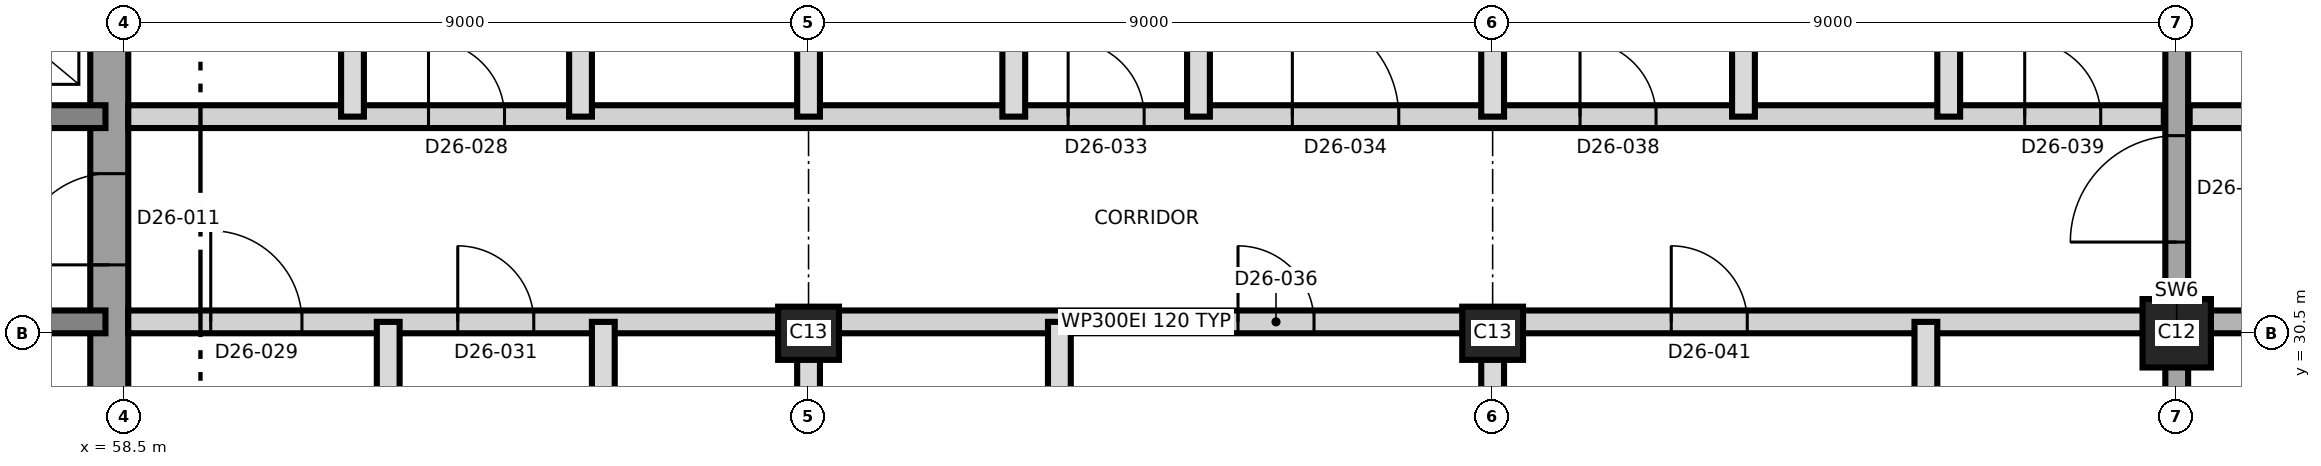
"""IFC4 building model, lengths in metres.
Left out: names, types, materials, properties, quantities, classifications, styles, units other than length and angle.
Written with IfcOpenShell. Run it as: python <this file> out.ifc"""

import sys

from ifc_helpers import new_model, si_unit, direction, frame, frame_2d, origin, origin_2d, place, context, subcontext, project, spatial, rectangle, extrude, element, fill, save


model = new_model("IFC4")
c1 = context("Model", 3, precision=1e-05, world=origin(), true_north=direction((0.0, 1.0)))
c2 = subcontext(c1, "Body", "Model", "MODEL_VIEW")
j1 = project(units=[si_unit("LENGTHUNIT", "METRE"), si_unit("PLANEANGLEUNIT", "RADIAN")], contexts=[c1])
p1 = place(None, origin())
s1 = spatial("IfcSite", under=j1, at=p1, CompositionType="ELEMENT")
p2 = place(p1, origin())
s2 = spatial("IfcBuilding", under=s1, at=p2, CompositionType="ELEMENT")
p3 = place(p2, frame((0.0, 0.0, 236.5)))
s3 = spatial("IfcBuildingStorey", under=s2, at=p3, CompositionType="ELEMENT", Elevation=236.5)
p4 = place(p3, frame((58.3, 21.25, 0.0), z_axis=(0.0, 0.0, 1.0), x_axis=(0.0, 1.0, 0.0)))
e1 = element("IfcWall", 1, at=p4, inside=s3, PredefinedType="SHEAR", context=c2, shape_type="SweptSolid", body=[
    extrude(rectangle(XDim=18.5, YDim=0.5, at=frame_2d((9.25, 0.0))), origin(), (0.0, 0.0, 1.0), 3.7),
])
p5 = place(p4, frame((10.15, 0.0, 0.0)))
e2 = element("IfcOpeningElement", 2, at=p5, cuts=e1, PredefinedType="OPENING", context=c2, shape_type="SweptSolid", body=[
    extrude(rectangle(XDim=1.2, YDim=2.1, at=frame_2d((0.6, 1.05))), frame((0.0, 0.26, 0.0), z_axis=(0.0, -1.0, 0.0), x_axis=(1.0, 0.0, 0.0)), (0.0, 0.0, 1.0), 0.52),
])
p6 = place(p3, frame((31.75, 30.65, 0.0), z_axis=(0.0, 0.0, 1.0), x_axis=(1.0, 0.0, 0.0)))
e3 = element("IfcWall", 3, at=p6, inside=s3, PredefinedType="SHEAR", context=c2, shape_type="SweptSolid", body=[
    extrude(rectangle(XDim=26.5, YDim=0.3, at=frame_2d((13.25, 0.0))), origin(), (0.0, 0.0, 1.0), 3.7),
])
p7 = place(p6, frame((24.75, 0.0, 0.0)))
e4 = element("IfcOpeningElement", 4, at=p7, cuts=e3, PredefinedType="OPENING", context=c2, shape_type="SweptSolid", body=[
    extrude(rectangle(XDim=1.0, YDim=2.1, at=frame_2d((0.5, 1.05))), frame((0.0, 0.16, 0.0), z_axis=(0.0, -1.0, 0.0), x_axis=(1.0, 0.0, 0.0)), (0.0, 0.0, 1.0), 0.32),
])
p8 = place(p3, frame((31.75, 33.35, 0.0), z_axis=(0.0, 0.0, 1.0), x_axis=(1.0, 0.0, 0.0)))
e5 = element("IfcWall", 5, at=p8, inside=s3, PredefinedType="SHEAR", context=c2, shape_type="SweptSolid", body=[
    extrude(rectangle(XDim=26.5, YDim=0.3, at=frame_2d((13.25, 0.0))), origin(), (0.0, 0.0, 1.0), 3.7),
])
p9 = place(p8, frame((13.9, 0.0, 0.0)))
e6 = element("IfcOpeningElement", 6, at=p9, cuts=e5, PredefinedType="OPENING", context=c2, shape_type="SweptSolid", body=[
    extrude(rectangle(XDim=1.4, YDim=2.1, at=frame_2d((0.7, 1.05))), frame((0.0, 0.16, 0.0), z_axis=(0.0, -1.0, 0.0), x_axis=(1.0, 0.0, 0.0)), (0.0, 0.0, 1.0), 0.32),
])
p10 = place(p8, frame((5.375, 0.0, 0.0)))
e7 = element("IfcOpeningElement", 7, at=p10, cuts=e5, PredefinedType="OPENING", context=c2, shape_type="SweptSolid", body=[
    extrude(rectangle(XDim=1.2, YDim=2.1, at=frame_2d((0.6, 1.05))), frame((0.0, 0.16, 0.0), z_axis=(0.0, -1.0, 0.0), x_axis=(1.0, 0.0, 0.0)), (0.0, 0.0, 1.0), 0.32),
])
p11 = place(p8, frame((19.925, 0.0, 0.0)))
e8 = element("IfcOpeningElement", 8, at=p11, cuts=e5, PredefinedType="OPENING", context=c2, shape_type="SweptSolid", body=[
    extrude(rectangle(XDim=1.2, YDim=2.1, at=frame_2d((0.6, 1.05))), frame((0.0, 0.16, 0.0), z_axis=(0.0, -1.0, 0.0), x_axis=(1.0, 0.0, 0.0)), (0.0, 0.0, 1.0), 0.32),
])
for number, where, z_axis, x_axis in (
    (9, (67.5, 30.5, 0.0), (0.0, 0.0, 1.0), (1.0, 0.0, 0.0)),
    (10, (76.5, 30.5, 0.0), (0.0, 0.0, 1.0), (1.0, 0.0, 0.0)),
):
    element("IfcColumn", number, at=place(p3, frame(where, z_axis=z_axis, x_axis=x_axis)), inside=s3, PredefinedType="COLUMN", context=c2, shape_type="SweptSolid", body=[
        extrude(rectangle(XDim=0.8, YDim=0.7, at=origin_2d()), origin(), (0.0, 0.0, 1.0), 3.7),
    ])
p12 = place(p3, frame((85.5, 30.5, 0.0), z_axis=(0.0, 0.0, 1.0), x_axis=(1.0, 0.0, 0.0)))
e11 = element("IfcColumn", 11, at=p12, inside=s3, PredefinedType="COLUMN", context=c2, shape_type="SweptSolid", body=[
    extrude(rectangle(XDim=0.9, YDim=0.9, at=origin_2d()), origin(), (0.0, 0.0, 1.0), 3.7),
])
p13 = place(p3, frame((85.5, 19.275, 0.0), z_axis=(0.0, 0.0, 1.0), x_axis=(0.0, 1.0, 0.0)))
e12 = element("IfcWall", 12, at=p13, inside=s3, PredefinedType="SHEAR", context=c2, shape_type="SweptSolid", body=[
    extrude(rectangle(XDim=22.45, YDim=0.3, at=frame_2d((11.225, 0.0))), origin(), (0.0, 0.0, 1.0), 3.7),
])
p14 = place(p13, frame((12.425, 0.0, 0.0)))
e13 = element("IfcOpeningElement", 13, at=p14, cuts=e12, PredefinedType="OPENING", context=c2, shape_type="SweptSolid", body=[
    extrude(rectangle(XDim=1.4, YDim=2.1, at=frame_2d((0.7, 1.05))), frame((0.0, 0.16, 0.0), z_axis=(0.0, -1.0, 0.0), x_axis=(1.0, 0.0, 0.0)), (0.0, 0.0, 1.0), 0.32),
])
p15 = place(p3, frame((58.55, 30.65, 0.0), z_axis=(0.0, 0.0, 1.0), x_axis=(1.0, 0.0, 0.0)))
e14 = element("IfcWall", 14, at=p15, inside=s3, PredefinedType="PARTITIONING", context=c2, shape_type="SweptSolid", body=[
    extrude(rectangle(XDim=26.78, YDim=0.3, at=frame_2d((13.39, 0.0))), origin(), (0.0, 0.0, 1.0), 3.4),
])
p16 = place(p15, frame((1.085, 0.0, 0.0)))
e15 = element("IfcOpeningElement", 15, at=p16, cuts=e14, PredefinedType="OPENING", context=c2, shape_type="SweptSolid", body=[
    extrude(rectangle(XDim=1.2, YDim=2.1, at=frame_2d((0.6, 1.05))), frame((0.0, 0.16, 0.0), z_axis=(0.0, -1.0, 0.0), x_axis=(1.0, 0.0, 0.0)), (0.0, 0.0, 1.0), 0.32),
])
p17 = place(p15, frame((4.335, 0.0, 0.0)))
e16 = element("IfcOpeningElement", 16, at=p17, cuts=e14, PredefinedType="OPENING", context=c2, shape_type="SweptSolid", body=[
    extrude(rectangle(XDim=1.0, YDim=2.1, at=frame_2d((0.5, 1.05))), frame((0.0, 0.16, 0.0), z_axis=(0.0, -1.0, 0.0), x_axis=(1.0, 0.0, 0.0)), (0.0, 0.0, 1.0), 0.32),
])
p18 = place(p15, frame((14.6, 0.0, 0.0)))
e17 = element("IfcOpeningElement", 17, at=p18, cuts=e14, PredefinedType="OPENING", context=c2, shape_type="SweptSolid", body=[
    extrude(rectangle(XDim=1.0, YDim=2.4, at=frame_2d((0.5, 1.2))), frame((0.0, 0.16, 0.0), z_axis=(0.0, -1.0, 0.0), x_axis=(1.0, 0.0, 0.0)), (0.0, 0.0, 1.0), 0.32),
])
p19 = place(p15, frame((20.3, 0.0, 0.0)))
e18 = element("IfcOpeningElement", 18, at=p19, cuts=e14, PredefinedType="OPENING", context=c2, shape_type="SweptSolid", body=[
    extrude(rectangle(XDim=1.0, YDim=2.4, at=frame_2d((0.5, 1.2))), frame((0.0, 0.16, 0.0), z_axis=(0.0, -1.0, 0.0), x_axis=(1.0, 0.0, 0.0)), (0.0, 0.0, 1.0), 0.32),
])
p20 = place(p3, frame((85.67, 30.65, 0.0), z_axis=(0.0, 0.0, 1.0), x_axis=(1.0, 0.0, 0.0)))
e19 = element("IfcWall", 19, at=p20, inside=s3, PredefinedType="SHEAR", context=c2, shape_type="SweptSolid", body=[
    extrude(rectangle(XDim=9.58, YDim=0.3, at=frame_2d((4.79, 0.0))), origin(), (0.0, 0.0, 1.0), 3.4),
])
p21 = place(p20, frame((2.08, 0.0, 0.0)))
e20 = element("IfcOpeningElement", 20, at=p21, cuts=e19, PredefinedType="OPENING", context=c2, shape_type="SweptSolid", body=[
    extrude(rectangle(XDim=1.2, YDim=2.1, at=frame_2d((0.6, 1.05))), frame((0.0, 0.16, 0.0), z_axis=(0.0, -1.0, 0.0), x_axis=(1.0, 0.0, 0.0)), (0.0, 0.0, 1.0), 0.32),
])
p22 = place(p20, frame((5.63, 0.0, 0.0)))
e21 = element("IfcOpeningElement", 21, at=p22, cuts=e19, PredefinedType="OPENING", context=c2, shape_type="SweptSolid", body=[
    extrude(rectangle(XDim=1.0, YDim=2.1, at=frame_2d((0.5, 1.05))), frame((0.0, 0.16, 0.0), z_axis=(0.0, -1.0, 0.0), x_axis=(1.0, 0.0, 0.0)), (0.0, 0.0, 1.0), 0.32),
])
p23 = place(p3, frame((58.55, 33.35, 0.0), z_axis=(0.0, 0.0, 1.0), x_axis=(1.0, 0.0, 0.0)))
e22 = element("IfcWall", 22, at=p23, inside=s3, PredefinedType="PARTITIONING", context=c2, shape_type="SweptSolid", body=[
    extrude(rectangle(XDim=26.78, YDim=0.3, at=frame_2d((13.39, 0.0))), origin(), (0.0, 0.0, 1.0), 3.4),
])
p24 = place(p23, frame((3.95, 0.0, 0.0)))
e23 = element("IfcOpeningElement", 23, at=p24, cuts=e22, PredefinedType="OPENING", context=c2, shape_type="SweptSolid", body=[
    extrude(rectangle(XDim=1.0, YDim=2.4, at=frame_2d((0.5, 1.2))), frame((0.0, 0.16, 0.0), z_axis=(0.0, -1.0, 0.0), x_axis=(1.0, 0.0, 0.0)), (0.0, 0.0, 1.0), 0.32),
])
p25 = place(p23, frame((12.365, 0.0, 0.0)))
e24 = element("IfcOpeningElement", 24, at=p25, cuts=e22, PredefinedType="OPENING", context=c2, shape_type="SweptSolid", body=[
    extrude(rectangle(XDim=1.0, YDim=2.1, at=frame_2d((0.5, 1.05))), frame((0.0, 0.16, 0.0), z_axis=(0.0, -1.0, 0.0), x_axis=(1.0, 0.0, 0.0)), (0.0, 0.0, 1.0), 0.32),
])
p26 = place(p23, frame((15.315, 0.0, 0.0)))
e25 = element("IfcOpeningElement", 25, at=p26, cuts=e22, PredefinedType="OPENING", context=c2, shape_type="SweptSolid", body=[
    extrude(rectangle(XDim=1.4, YDim=2.1, at=frame_2d((0.7, 1.05))), frame((0.0, 0.16, 0.0), z_axis=(0.0, -1.0, 0.0), x_axis=(1.0, 0.0, 0.0)), (0.0, 0.0, 1.0), 0.32),
])
p27 = place(p23, frame((19.1, 0.0, 0.0)))
e26 = element("IfcOpeningElement", 26, at=p27, cuts=e22, PredefinedType="OPENING", context=c2, shape_type="SweptSolid", body=[
    extrude(rectangle(XDim=1.0, YDim=2.1, at=frame_2d((0.5, 1.05))), frame((0.0, 0.16, 0.0), z_axis=(0.0, -1.0, 0.0), x_axis=(1.0, 0.0, 0.0)), (0.0, 0.0, 1.0), 0.32),
])
p28 = place(p23, frame((24.95, 0.0, 0.0)))
e27 = element("IfcOpeningElement", 27, at=p28, cuts=e22, PredefinedType="OPENING", context=c2, shape_type="SweptSolid", body=[
    extrude(rectangle(XDim=1.0, YDim=2.1, at=frame_2d((0.5, 1.05))), frame((0.0, 0.16, 0.0), z_axis=(0.0, -1.0, 0.0), x_axis=(1.0, 0.0, 0.0)), (0.0, 0.0, 1.0), 0.32),
])
p29 = place(p3, frame((85.67, 33.35, 0.0), z_axis=(0.0, 0.0, 1.0), x_axis=(1.0, 0.0, 0.0)))
e28 = element("IfcWall", 28, at=p29, inside=s3, PredefinedType="PARTITIONING", context=c2, shape_type="SweptSolid", body=[
    extrude(rectangle(XDim=9.58, YDim=0.3, at=frame_2d((4.79, 0.0))), origin(), (0.0, 0.0, 1.0), 3.4),
])
p30 = place(p29, frame((1.83, 0.0, 0.0)))
e29 = element("IfcOpeningElement", 29, at=p30, cuts=e28, PredefinedType="OPENING", context=c2, shape_type="SweptSolid", body=[
    extrude(rectangle(XDim=1.0, YDim=2.1, at=frame_2d((0.5, 1.05))), frame((0.0, 0.16, 0.0), z_axis=(0.0, -1.0, 0.0), x_axis=(1.0, 0.0, 0.0)), (0.0, 0.0, 1.0), 0.32),
])
p31 = place(p29, frame((5.63, 0.0, 0.0)))
e30 = element("IfcOpeningElement", 30, at=p31, cuts=e28, PredefinedType="OPENING", context=c2, shape_type="SweptSolid", body=[
    extrude(rectangle(XDim=1.0, YDim=2.1, at=frame_2d((0.5, 1.05))), frame((0.0, 0.16, 0.0), z_axis=(0.0, -1.0, 0.0), x_axis=(1.0, 0.0, 0.0)), (0.0, 0.0, 1.0), 0.32),
])
p32 = place(p3, frame((61.5, 33.35, 0.0), z_axis=(0.0, 0.0, 1.0), x_axis=(0.0, 1.0, 0.0)))
e31 = element("IfcWall", 31, at=p32, inside=s3, PredefinedType="PARTITIONING", context=c2, shape_type="SweptSolid", body=[
    extrude(rectangle(XDim=3.3, YDim=0.3, at=frame_2d((1.65, 0.0))), origin(), (0.0, 0.0, 1.0), 3.4),
])
p33 = place(p3, frame((61.97, 19.275, 0.0), z_axis=(0.0, 0.0, 1.0), x_axis=(0.0, 1.0, 0.0)))
e32 = element("IfcWall", 32, at=p33, inside=s3, PredefinedType="PARTITIONING", context=c2, shape_type="SweptSolid", body=[
    extrude(rectangle(XDim=11.375, YDim=0.3, at=frame_2d((5.688, 0.0))), origin(), (0.0, 0.0, 1.0), 3.4),
])
p34 = place(p3, frame((64.5, 33.35, 0.0), z_axis=(0.0, 0.0, 1.0), x_axis=(0.0, 1.0, 0.0)))
e33 = element("IfcWall", 33, at=p34, inside=s3, PredefinedType="PARTITIONING", context=c2, shape_type="SweptSolid", body=[
    extrude(rectangle(XDim=3.3, YDim=0.3, at=frame_2d((1.65, 0.0))), origin(), (0.0, 0.0, 1.0), 3.4),
])
p35 = place(p3, frame((64.8, 27.45, 0.0), z_axis=(0.0, 0.0, 1.0), x_axis=(0.0, 1.0, 0.0)))
e34 = element("IfcWall", 34, at=p35, inside=s3, PredefinedType="PARTITIONING", context=c2, shape_type="SweptSolid", body=[
    extrude(rectangle(XDim=3.2, YDim=0.3, at=frame_2d((1.6, 0.0))), origin(), (0.0, 0.0, 1.0), 3.4),
])
p36 = place(p3, frame((67.5, 19.275, 0.0), z_axis=(0.0, 0.0, 1.0), x_axis=(0.0, 1.0, 0.0)))
e35 = element("IfcWall", 35, at=p36, inside=s3, PredefinedType="PARTITIONING", context=c2, shape_type="SweptSolid", body=[
    extrude(rectangle(XDim=11.375, YDim=0.3, at=frame_2d((5.688, 0.0))), origin(), (0.0, 0.0, 1.0), 3.4),
])
p37 = place(p3, frame((67.5, 33.35, 0.0), z_axis=(0.0, 0.0, 1.0), x_axis=(0.0, 1.0, 0.0)))
e36 = element("IfcWall", 36, at=p37, inside=s3, PredefinedType="PARTITIONING", context=c2, shape_type="SweptSolid", body=[
    extrude(rectangle(XDim=8.555, YDim=0.3, at=frame_2d((4.277, 0.0))), origin(), (0.0, 0.0, 1.0), 3.4),
])
p38 = place(p3, frame((70.2, 33.35, 0.0), z_axis=(0.0, 0.0, 1.0), x_axis=(0.0, 1.0, 0.0)))
e37 = element("IfcWall", 37, at=p38, inside=s3, PredefinedType="PARTITIONING", context=c2, shape_type="SweptSolid", body=[
    extrude(rectangle(XDim=3.2, YDim=0.3, at=frame_2d((1.6, 0.0))), origin(), (0.0, 0.0, 1.0), 3.4),
])
p39 = place(p3, frame((70.8, 27.15, 0.0), z_axis=(0.0, 0.0, 1.0), x_axis=(0.0, 1.0, 0.0)))
e38 = element("IfcWall", 38, at=p39, inside=s3, PredefinedType="PARTITIONING", context=c2, shape_type="SweptSolid", body=[
    extrude(rectangle(XDim=3.5, YDim=0.3, at=frame_2d((1.75, 0.0))), origin(), (0.0, 0.0, 1.0), 3.4),
])
p40 = place(p3, frame((72.63, 33.35, 0.0), z_axis=(0.0, 0.0, 1.0), x_axis=(0.0, 1.0, 0.0)))
e39 = element("IfcWall", 39, at=p40, inside=s3, PredefinedType="PARTITIONING", context=c2, shape_type="SweptSolid", body=[
    extrude(rectangle(XDim=8.515, YDim=0.3, at=frame_2d((4.257, 0.0))), origin(), (0.0, 0.0, 1.0), 3.4),
])
p41 = place(p3, frame((76.5, 19.275, 0.0), z_axis=(0.0, 0.0, 1.0), x_axis=(0.0, 1.0, 0.0)))
e40 = element("IfcWall", 40, at=p41, inside=s3, PredefinedType="PARTITIONING", context=c2, shape_type="SweptSolid", body=[
    extrude(rectangle(XDim=11.375, YDim=0.3, at=frame_2d((5.688, 0.0))), origin(), (0.0, 0.0, 1.0), 3.4),
])
p42 = place(p3, frame((76.5, 33.35, 0.0), z_axis=(0.0, 0.0, 1.0), x_axis=(0.0, 1.0, 0.0)))
e41 = element("IfcWall", 41, at=p42, inside=s3, PredefinedType="PARTITIONING", context=c2, shape_type="SweptSolid", body=[
    extrude(rectangle(XDim=8.555, YDim=0.3, at=frame_2d((4.277, 0.0))), origin(), (0.0, 0.0, 1.0), 3.4),
])
p43 = place(p3, frame((79.8, 33.35, 0.0), z_axis=(0.0, 0.0, 1.0), x_axis=(0.0, 1.0, 0.0)))
e42 = element("IfcWall", 42, at=p43, inside=s3, PredefinedType="PARTITIONING", context=c2, shape_type="SweptSolid", body=[
    extrude(rectangle(XDim=3.2, YDim=0.3, at=frame_2d((1.6, 0.0))), origin(), (0.0, 0.0, 1.0), 3.4),
])
p44 = place(p3, frame((82.2, 27.15, 0.0), z_axis=(0.0, 0.0, 1.0), x_axis=(0.0, 1.0, 0.0)))
e43 = element("IfcWall", 43, at=p44, inside=s3, PredefinedType="PARTITIONING", context=c2, shape_type="SweptSolid", body=[
    extrude(rectangle(XDim=3.5, YDim=0.3, at=frame_2d((1.75, 0.0))), origin(), (0.0, 0.0, 1.0), 3.4),
])
p45 = place(p3, frame((82.5, 33.35, 0.0), z_axis=(0.0, 0.0, 1.0), x_axis=(0.0, 1.0, 0.0)))
e44 = element("IfcWall", 44, at=p45, inside=s3, PredefinedType="PARTITIONING", context=c2, shape_type="SweptSolid", body=[
    extrude(rectangle(XDim=8.555, YDim=0.3, at=frame_2d((4.277, 0.0))), origin(), (0.0, 0.0, 1.0), 3.4),
])
p46 = place(p5, origin())
e45 = element("IfcDoor", 45, at=p46, inside=s3, OperationType="SINGLE_SWING_LEFT", PredefinedType="DOOR", context=c2, shape_type="SweptSolid", body=[
    extrude(rectangle(XDim=1.2, YDim=2.1, at=frame_2d((0.6, 1.05))), frame((0.0, 0.025, 0.0), z_axis=(0.0, -1.0, 0.0), x_axis=(1.0, 0.0, 0.0)), (0.0, 0.0, 1.0), 0.05),
])
fill(e2, e45)
p47 = place(p24, origin())
e46 = element("IfcDoor", 46, at=p47, inside=s3, OperationType="SINGLE_SWING_LEFT", PredefinedType="DOOR", context=c2, shape_type="SweptSolid", body=[
    extrude(rectangle(XDim=1.0, YDim=2.4, at=frame_2d((0.5, 1.2))), frame((0.0, 0.025, 0.0), z_axis=(0.0, -1.0, 0.0), x_axis=(1.0, 0.0, 0.0)), (0.0, 0.0, 1.0), 0.05),
])
fill(e23, e46)
p48 = place(p16, origin())
e47 = element("IfcDoor", 47, at=p48, inside=s3, OperationType="SINGLE_SWING_LEFT", PredefinedType="DOOR", context=c2, shape_type="SweptSolid", body=[
    extrude(rectangle(XDim=1.2, YDim=2.1, at=frame_2d((0.6, 1.05))), frame((0.0, 0.025, 0.0), z_axis=(0.0, -1.0, 0.0), x_axis=(1.0, 0.0, 0.0)), (0.0, 0.0, 1.0), 0.05),
])
fill(e15, e47)
p49 = place(p17, origin())
e48 = element("IfcDoor", 48, at=p49, inside=s3, OperationType="SINGLE_SWING_LEFT", PredefinedType="DOOR", context=c2, shape_type="SweptSolid", body=[
    extrude(rectangle(XDim=1.0, YDim=2.1, at=frame_2d((0.5, 1.05))), frame((0.0, 0.025, 0.0), z_axis=(0.0, -1.0, 0.0), x_axis=(1.0, 0.0, 0.0)), (0.0, 0.0, 1.0), 0.05),
])
fill(e16, e48)
p50 = place(p25, origin())
e49 = element("IfcDoor", 49, at=p50, inside=s3, OperationType="SINGLE_SWING_LEFT", PredefinedType="DOOR", context=c2, shape_type="SweptSolid", body=[
    extrude(rectangle(XDim=1.0, YDim=2.1, at=frame_2d((0.5, 1.05))), frame((0.0, 0.025, 0.0), z_axis=(0.0, -1.0, 0.0), x_axis=(1.0, 0.0, 0.0)), (0.0, 0.0, 1.0), 0.05),
])
fill(e24, e49)
p51 = place(p26, origin())
e50 = element("IfcDoor", 50, at=p51, inside=s3, OperationType="SINGLE_SWING_RIGHT", PredefinedType="DOOR", context=c2, shape_type="SweptSolid", body=[
    extrude(rectangle(XDim=1.4, YDim=2.1, at=frame_2d((0.7, 1.05))), frame((0.0, 0.025, 0.0), z_axis=(0.0, -1.0, 0.0), x_axis=(1.0, 0.0, 0.0)), (0.0, 0.0, 1.0), 0.05),
])
fill(e25, e50)
p52 = place(p18, origin())
e51 = element("IfcDoor", 51, at=p52, inside=s3, OperationType="SINGLE_SWING_LEFT", PredefinedType="DOOR", context=c2, shape_type="SweptSolid", body=[
    extrude(rectangle(XDim=1.0, YDim=2.4, at=frame_2d((0.5, 1.2))), frame((0.0, 0.025, 0.0), z_axis=(0.0, -1.0, 0.0), x_axis=(1.0, 0.0, 0.0)), (0.0, 0.0, 1.0), 0.05),
])
fill(e17, e51)
p53 = place(p27, origin())
e52 = element("IfcDoor", 52, at=p53, inside=s3, OperationType="SINGLE_SWING_RIGHT", PredefinedType="DOOR", context=c2, shape_type="SweptSolid", body=[
    extrude(rectangle(XDim=1.0, YDim=2.1, at=frame_2d((0.5, 1.05))), frame((0.0, 0.025, 0.0), z_axis=(0.0, -1.0, 0.0), x_axis=(1.0, 0.0, 0.0)), (0.0, 0.0, 1.0), 0.05),
])
fill(e26, e52)
p54 = place(p28, origin())
e53 = element("IfcDoor", 53, at=p54, inside=s3, OperationType="SINGLE_SWING_LEFT", PredefinedType="DOOR", context=c2, shape_type="SweptSolid", body=[
    extrude(rectangle(XDim=1.0, YDim=2.1, at=frame_2d((0.5, 1.05))), frame((0.0, 0.025, 0.0), z_axis=(0.0, -1.0, 0.0), x_axis=(1.0, 0.0, 0.0)), (0.0, 0.0, 1.0), 0.05),
])
fill(e27, e53)
p55 = place(p19, origin())
e54 = element("IfcDoor", 54, at=p55, inside=s3, OperationType="SINGLE_SWING_RIGHT", PredefinedType="DOOR", context=c2, shape_type="SweptSolid", body=[
    extrude(rectangle(XDim=1.0, YDim=2.4, at=frame_2d((0.5, 1.2))), frame((0.0, 0.025, 0.0), z_axis=(0.0, -1.0, 0.0), x_axis=(1.0, 0.0, 0.0)), (0.0, 0.0, 1.0), 0.05),
])
fill(e18, e54)
p56 = place(p14, origin())
e55 = element("IfcDoor", 55, at=p56, inside=s3, OperationType="SINGLE_SWING_RIGHT", PredefinedType="DOOR", context=c2, shape_type="SweptSolid", body=[
    extrude(rectangle(XDim=1.4, YDim=2.1, at=frame_2d((0.7, 1.05))), frame((0.0, 0.025, 0.0), z_axis=(0.0, -1.0, 0.0), x_axis=(1.0, 0.0, 0.0)), (0.0, 0.0, 1.0), 0.05),
])
fill(e13, e55)
save(model, sys.argv[1])
